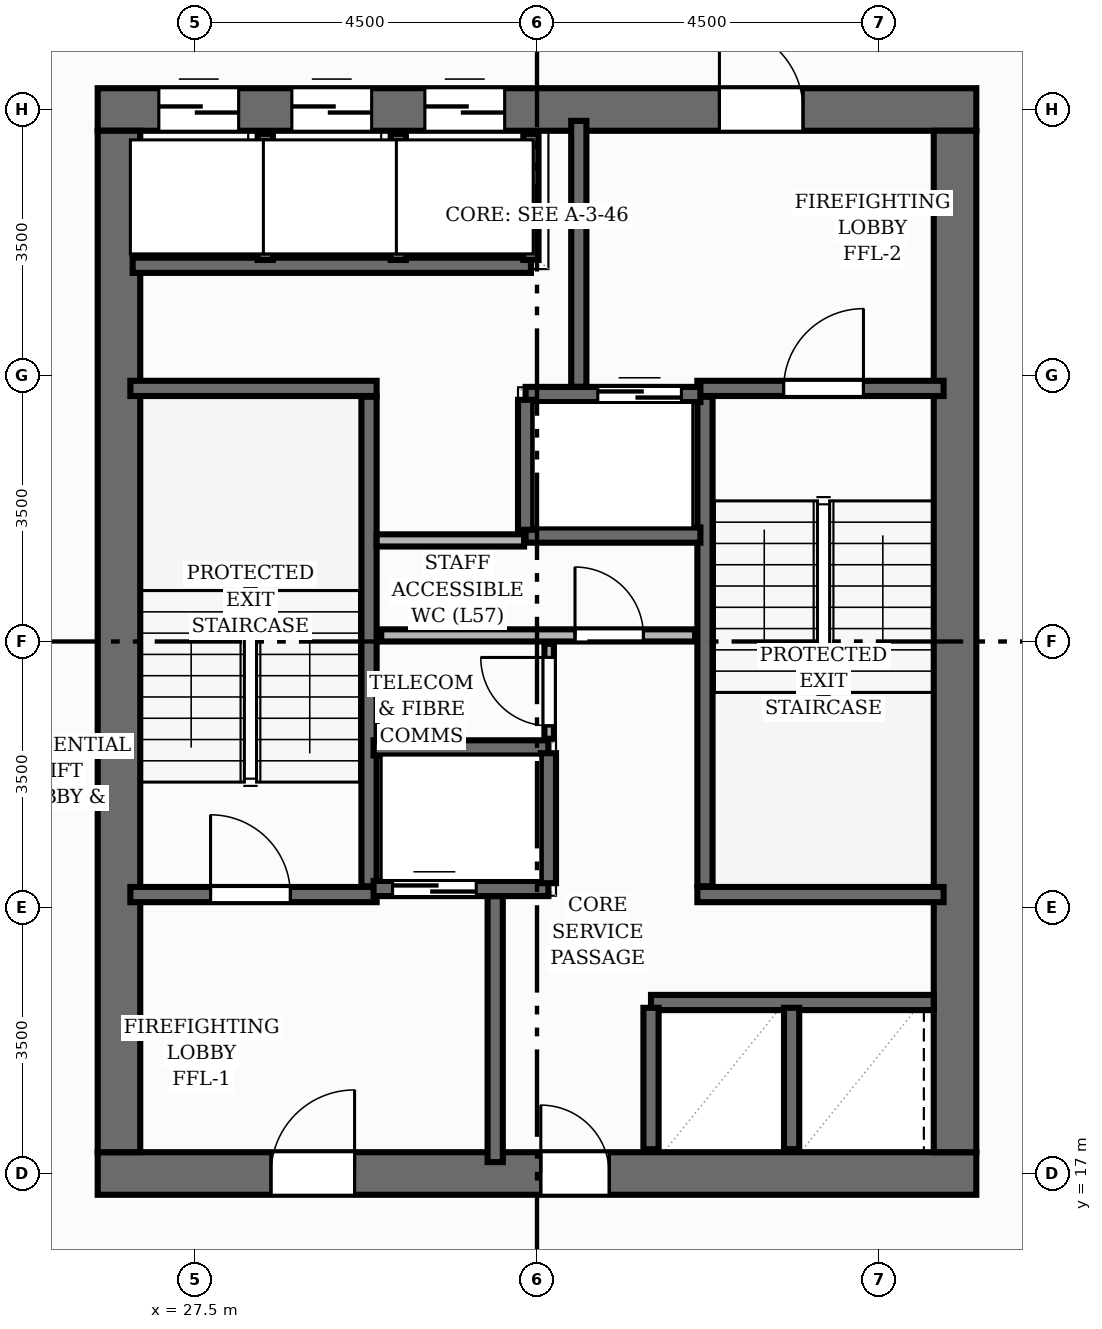
"""IFC4 building model, lengths in metres.
Left out: names, types, materials, properties, quantities, classifications, styles, units other than length and angle.
Written with IfcOpenShell. Run it as: python <this file> out.ifc"""

import sys

from ifc_helpers import new_model, si_unit, direction, frame, frame_2d, origin, place, context, subcontext, project, spatial, rectangle, extrude, element, fill, save


model = new_model("IFC4")
c1 = context("Model", 3, precision=1e-05, world=origin(), true_north=direction((0.0, 1.0)))
c2 = subcontext(c1, "Body", "Model", "MODEL_VIEW")
j1 = project(units=[si_unit("LENGTHUNIT", "METRE"), si_unit("PLANEANGLEUNIT", "RADIAN")], contexts=[c1])
p1 = place(None, origin())
s1 = spatial("IfcSite", under=j1, at=p1, CompositionType="ELEMENT")
p2 = place(p1, origin())
s2 = spatial("IfcBuilding", under=s1, at=p2, CompositionType="ELEMENT")
p3 = place(p2, frame((0.0, 0.0, 191.84)))
s3 = spatial("IfcBuildingStorey", under=s2, at=p3, CompositionType="ELEMENT", Elevation=191.84)
p4 = place(p3, frame((26.22, 17.0, 0.0), z_axis=(0.0, 0.0, 1.0), x_axis=(1.0, 0.0, 0.0)))
e1 = element("IfcWall", 1, at=p4, inside=s3, PredefinedType="SHEAR", context=c2, shape_type="SweptSolid", body=[
    extrude(rectangle(XDim=11.56, YDim=0.56, at=frame_2d((5.78, 0.0))), origin(), (0.0, 0.0, 1.0), 3.2),
])
p5 = place(p4, frame((2.28, 0.0, 0.0)))
e2 = element("IfcOpeningElement", 2, at=p5, cuts=e1, PredefinedType="OPENING", context=c2, shape_type="SweptSolid", body=[
    extrude(rectangle(XDim=1.1, YDim=2.15, at=frame_2d((0.55, 1.075))), frame((0.0, 0.29, 0.0), z_axis=(0.0, -1.0, 0.0), x_axis=(1.0, 0.0, 0.0)), (0.0, 0.0, 1.0), 0.58),
])
p6 = place(p4, frame((5.83, 0.0, 0.0)))
e3 = element("IfcOpeningElement", 3, at=p6, cuts=e1, PredefinedType="OPENING", context=c2, shape_type="SweptSolid", body=[
    extrude(rectangle(XDim=0.9, YDim=2.1, at=frame_2d((0.45, 1.05))), frame((0.0, 0.29, 0.0), z_axis=(0.0, -1.0, 0.0), x_axis=(1.0, 0.0, 0.0)), (0.0, 0.0, 1.0), 0.58),
])
p7 = place(p3, frame((26.22, 31.0, 0.0), z_axis=(0.0, 0.0, 1.0), x_axis=(1.0, 0.0, 0.0)))
e4 = element("IfcWall", 4, at=p7, inside=s3, PredefinedType="SHEAR", context=c2, shape_type="SweptSolid", body=[
    extrude(rectangle(XDim=11.56, YDim=0.56, at=frame_2d((5.78, 0.0))), origin(), (0.0, 0.0, 1.0), 3.2),
])
p8 = place(p7, frame((8.18, 0.0, 0.0)))
e5 = element("IfcOpeningElement", 5, at=p8, cuts=e4, PredefinedType="OPENING", context=c2, shape_type="SweptSolid", body=[
    extrude(rectangle(XDim=1.1, YDim=2.15, at=frame_2d((0.55, 1.075))), frame((0.0, 0.29, 0.0), z_axis=(0.0, -1.0, 0.0), x_axis=(1.0, 0.0, 0.0)), (0.0, 0.0, 1.0), 0.58),
])
p9 = place(p7, frame((0.805, 0.0, 0.0)))
e6 = element("IfcOpeningElement", 6, at=p9, cuts=e4, PredefinedType="OPENING", context=c2, shape_type="SweptSolid", body=[
    extrude(rectangle(XDim=1.05, YDim=2.15, at=frame_2d((0.525, 1.075))), frame((0.0, 0.29, 0.0), z_axis=(0.0, -1.0, 0.0), x_axis=(1.0, 0.0, 0.0)), (0.0, 0.0, 1.0), 0.58),
])
p10 = place(p7, frame((2.555, 0.0, 0.0)))
e7 = element("IfcOpeningElement", 7, at=p10, cuts=e4, PredefinedType="OPENING", context=c2, shape_type="SweptSolid", body=[
    extrude(rectangle(XDim=1.05, YDim=2.15, at=frame_2d((0.525, 1.075))), frame((0.0, 0.29, 0.0), z_axis=(0.0, -1.0, 0.0), x_axis=(1.0, 0.0, 0.0)), (0.0, 0.0, 1.0), 0.58),
])
p11 = place(p7, frame((4.305, 0.0, 0.0)))
e8 = element("IfcOpeningElement", 8, at=p11, cuts=e4, PredefinedType="OPENING", context=c2, shape_type="SweptSolid", body=[
    extrude(rectangle(XDim=1.05, YDim=2.15, at=frame_2d((0.525, 1.075))), frame((0.0, 0.29, 0.0), z_axis=(0.0, -1.0, 0.0), x_axis=(1.0, 0.0, 0.0)), (0.0, 0.0, 1.0), 0.58),
])
for number, where, z_axis, x_axis in (
    (9, (26.5, 17.28, 0.0), (0.0, 0.0, 1.0), (0.0, 1.0, 0.0)),
    (10, (37.5, 17.28, 0.0), (0.0, 0.0, 1.0), (0.0, 1.0, 0.0)),
):
    element("IfcWall", number, at=place(p3, frame(where, z_axis=z_axis, x_axis=x_axis)), inside=s3, PredefinedType="SHEAR", context=c2, shape_type="SweptSolid", body=[
        extrude(rectangle(XDim=13.44, YDim=0.56, at=frame_2d((6.72, 0.0))), origin(), (0.0, 0.0, 1.0), 3.2),
    ])
p12 = place(p3, frame((29.79, 20.78, 0.0), z_axis=(0.0, 0.0, 1.0), x_axis=(0.0, 1.0, 0.0)))
e11 = element("IfcWall", 11, at=p12, inside=s3, PredefinedType="SHEAR", context=c2, shape_type="SweptSolid", body=[
    extrude(rectangle(XDim=6.44, YDim=0.2, at=frame_2d((3.22, 0.0))), origin(), (0.0, 0.0, 1.0), 3.2),
])
p13 = place(p3, frame((26.65, 27.33, 0.0), z_axis=(0.0, 0.0, 1.0), x_axis=(1.0, 0.0, 0.0)))
e12 = element("IfcWall", 12, at=p13, inside=s3, PredefinedType="SHEAR", context=c2, shape_type="SweptSolid", body=[
    extrude(rectangle(XDim=3.24, YDim=0.2, at=frame_2d((1.62, 0.0))), origin(), (0.0, 0.0, 1.0), 3.2),
])
p14 = place(p3, frame((26.65, 20.67, 0.0), z_axis=(0.0, 0.0, 1.0), x_axis=(1.0, 0.0, 0.0)))
e13 = element("IfcWall", 13, at=p14, inside=s3, PredefinedType="SHEAR", context=c2, shape_type="SweptSolid", body=[
    extrude(rectangle(XDim=3.24, YDim=0.2, at=frame_2d((1.62, 0.0))), origin(), (0.0, 0.0, 1.0), 3.2),
])
p15 = place(p14, frame((1.055, 0.0, 0.0)))
e14 = element("IfcOpeningElement", 14, at=p15, cuts=e13, PredefinedType="OPENING", context=c2, shape_type="SweptSolid", body=[
    extrude(rectangle(XDim=1.05, YDim=2.15, at=frame_2d((0.525, 1.075))), frame((0.0, 0.11, 0.0), z_axis=(0.0, -1.0, 0.0), x_axis=(1.0, 0.0, 0.0)), (0.0, 0.0, 1.0), 0.22),
])
p16 = place(p3, frame((34.21, 20.78, 0.0), z_axis=(0.0, 0.0, 1.0), x_axis=(0.0, 1.0, 0.0)))
e15 = element("IfcWall", 15, at=p16, inside=s3, PredefinedType="SHEAR", context=c2, shape_type="SweptSolid", body=[
    extrude(rectangle(XDim=6.44, YDim=0.2, at=frame_2d((3.22, 0.0))), origin(), (0.0, 0.0, 1.0), 3.2),
])
p17 = place(p3, frame((34.11, 20.67, 0.0), z_axis=(0.0, 0.0, 1.0), x_axis=(1.0, 0.0, 0.0)))
e16 = element("IfcWall", 16, at=p17, inside=s3, PredefinedType="SHEAR", context=c2, shape_type="SweptSolid", body=[
    extrude(rectangle(XDim=3.24, YDim=0.2, at=frame_2d((1.62, 0.0))), origin(), (0.0, 0.0, 1.0), 3.2),
])
p18 = place(p3, frame((34.11, 27.33, 0.0), z_axis=(0.0, 0.0, 1.0), x_axis=(1.0, 0.0, 0.0)))
e17 = element("IfcWall", 17, at=p18, inside=s3, PredefinedType="SHEAR", context=c2, shape_type="SweptSolid", body=[
    extrude(rectangle(XDim=3.24, YDim=0.2, at=frame_2d((1.62, 0.0))), origin(), (0.0, 0.0, 1.0), 3.2),
])
p19 = place(p18, frame((1.135, 0.0, 0.0)))
e18 = element("IfcOpeningElement", 18, at=p19, cuts=e17, PredefinedType="OPENING", context=c2, shape_type="SweptSolid", body=[
    extrude(rectangle(XDim=1.05, YDim=2.15, at=frame_2d((0.525, 1.075))), frame((0.0, 0.11, 0.0), z_axis=(0.0, -1.0, 0.0), x_axis=(1.0, 0.0, 0.0)), (0.0, 0.0, 1.0), 0.22),
])
for number, where, z_axis, x_axis in (
    (19, (31.45, 17.15, 0.0), (0.0, 0.0, 1.0), (0.0, 1.0, 0.0)),
    (20, (32.55, 27.35, 0.0), (0.0, 0.0, 1.0), (0.0, 1.0, 0.0)),
):
    element("IfcWall", number, at=place(p3, frame(where, z_axis=z_axis, x_axis=x_axis)), inside=s3, PredefinedType="SHEAR", context=c2, shape_type="SweptSolid", body=[
        extrude(rectangle(XDim=3.5, YDim=0.2, at=frame_2d((1.75, 0.0))), origin(), (0.0, 0.0, 1.0), 3.2),
    ])
p20 = place(p3, frame((29.85, 20.75, 0.0), z_axis=(0.0, 0.0, 1.0), x_axis=(1.0, 0.0, 0.0)))
e21 = element("IfcWall", 21, at=p20, inside=s3, PredefinedType="SHEAR", context=c2, shape_type="SweptSolid", body=[
    extrude(rectangle(XDim=2.3, YDim=0.2, at=frame_2d((1.15, 0.0))), origin(), (0.0, 0.0, 1.0), 3.2),
])
p21 = place(p20, frame((0.25, 0.0, 0.0)))
e22 = element("IfcOpeningElement", 22, at=p21, cuts=e21, PredefinedType="OPENING", context=c2, shape_type="SweptSolid", body=[
    extrude(rectangle(XDim=1.1, YDim=2.15, at=frame_2d((0.55, 1.075))), frame((0.0, 0.11, 0.0), z_axis=(0.0, -1.0, 0.0), x_axis=(1.0, 0.0, 0.0)), (0.0, 0.0, 1.0), 0.22),
])
p22 = place(p3, frame((29.85, 22.6, 0.0), z_axis=(0.0, 0.0, 1.0), x_axis=(1.0, 0.0, 0.0)))
e23 = element("IfcWall", 23, at=p22, inside=s3, PredefinedType="SHEAR", context=c2, shape_type="SweptSolid", body=[
    extrude(rectangle(XDim=2.3, YDim=0.2, at=frame_2d((1.15, 0.0))), origin(), (0.0, 0.0, 1.0), 3.2),
])
p23 = place(p3, frame((32.15, 20.82, 0.0), z_axis=(0.0, 0.0, 1.0), x_axis=(0.0, 1.0, 0.0)))
e24 = element("IfcWall", 24, at=p23, inside=s3, PredefinedType="SHEAR", context=c2, shape_type="SweptSolid", body=[
    extrude(rectangle(XDim=1.71, YDim=0.2, at=frame_2d((0.855, 0.0))), origin(), (0.0, 0.0, 1.0), 3.2),
])
p24 = place(p3, frame((31.85, 27.25, 0.0), z_axis=(0.0, 0.0, 1.0), x_axis=(1.0, 0.0, 0.0)))
e25 = element("IfcWall", 25, at=p24, inside=s3, PredefinedType="SHEAR", context=c2, shape_type="SweptSolid", body=[
    extrude(rectangle(XDim=2.3, YDim=0.2, at=frame_2d((1.15, 0.0))), origin(), (0.0, 0.0, 1.0), 3.2),
])
p25 = place(p24, frame((0.95, 0.0, 0.0)))
e26 = element("IfcOpeningElement", 26, at=p25, cuts=e25, PredefinedType="OPENING", context=c2, shape_type="SweptSolid", body=[
    extrude(rectangle(XDim=1.1, YDim=2.15, at=frame_2d((0.55, 1.075))), frame((0.0, 0.11, 0.0), z_axis=(0.0, -1.0, 0.0), x_axis=(1.0, 0.0, 0.0)), (0.0, 0.0, 1.0), 0.22),
])
p26 = place(p3, frame((31.85, 25.4, 0.0), z_axis=(0.0, 0.0, 1.0), x_axis=(1.0, 0.0, 0.0)))
e27 = element("IfcWall", 27, at=p26, inside=s3, PredefinedType="SHEAR", context=c2, shape_type="SweptSolid", body=[
    extrude(rectangle(XDim=2.3, YDim=0.2, at=frame_2d((1.15, 0.0))), origin(), (0.0, 0.0, 1.0), 3.2),
])
p27 = place(p3, frame((31.85, 25.47, 0.0), z_axis=(0.0, 0.0, 1.0), x_axis=(0.0, 1.0, 0.0)))
e28 = element("IfcWall", 28, at=p27, inside=s3, PredefinedType="SHEAR", context=c2, shape_type="SweptSolid", body=[
    extrude(rectangle(XDim=1.71, YDim=0.2, at=frame_2d((0.855, 0.0))), origin(), (0.0, 0.0, 1.0), 3.2),
])
p28 = place(p3, frame((26.68, 28.95, 0.0), z_axis=(0.0, 0.0, 1.0), x_axis=(1.0, 0.0, 0.0)))
e29 = element("IfcWall", 29, at=p28, inside=s3, PredefinedType="SHEAR", context=c2, shape_type="SweptSolid", body=[
    extrude(rectangle(XDim=5.24, YDim=0.2, at=frame_2d((2.62, 0.0))), origin(), (0.0, 0.0, 1.0), 3.2),
])
for number, where, z_axis, x_axis in (
    (30, (31.92, 29.02, 0.0), (0.0, 0.0, 1.0), (0.0, 1.0, 0.0)),
    (31, (28.425, 29.02, 0.0), (0.0, 0.0, 1.0), (0.0, 1.0, 0.0)),
    (32, (30.175, 29.02, 0.0), (0.0, 0.0, 1.0), (0.0, 1.0, 0.0)),
):
    element("IfcWall", number, at=place(p3, frame(where, z_axis=z_axis, x_axis=x_axis)), inside=s3, PredefinedType="SHEAR", context=c2, shape_type="SweptSolid", body=[
        extrude(rectangle(XDim=1.66, YDim=0.2, at=frame_2d((0.83, 0.0))), origin(), (0.0, 0.0, 1.0), 3.2),
    ])
p29 = place(p3, frame((33.5, 19.25, 0.0), z_axis=(0.0, 0.0, 1.0), x_axis=(1.0, 0.0, 0.0)))
e33 = element("IfcWall", 33, at=p29, inside=s3, PredefinedType="SHEAR", context=c2, shape_type="SweptSolid", body=[
    extrude(rectangle(XDim=3.72, YDim=0.2, at=frame_2d((1.86, 0.0))), origin(), (0.0, 0.0, 1.0), 3.2),
])
for number, where, z_axis, x_axis in (
    (34, (33.5, 17.32, 0.0), (0.0, 0.0, 1.0), (0.0, 1.0, 0.0)),
    (35, (35.35, 17.32, 0.0), (0.0, 0.0, 1.0), (0.0, 1.0, 0.0)),
):
    element("IfcWall", number, at=place(p3, frame(where, z_axis=z_axis, x_axis=x_axis)), inside=s3, PredefinedType="SHEAR", context=c2, shape_type="SweptSolid", body=[
        extrude(rectangle(XDim=1.86, YDim=0.2, at=frame_2d((0.93, 0.0))), origin(), (0.0, 0.0, 1.0), 3.2),
    ])
p30 = place(p3, frame((29.95, 24.08, 0.0), z_axis=(0.0, 0.0, 1.0), x_axis=(1.0, 0.0, 0.0)))
e36 = element("IfcWall", 36, at=p30, inside=s3, PredefinedType="PLUMBINGWALL", context=c2, shape_type="SweptSolid", body=[
    extrude(rectangle(XDim=4.13, YDim=0.16, at=frame_2d((2.065, 0.0))), origin(), (0.0, 0.0, 1.0), 2.955),
])
p31 = place(p30, frame((2.55, 0.0, 0.0)))
e37 = element("IfcOpeningElement", 37, at=p31, cuts=e36, PredefinedType="OPENING", context=c2, shape_type="SweptSolid", body=[
    extrude(rectangle(XDim=0.9, YDim=2.1, at=frame_2d((0.45, 1.05))), frame((0.0, 0.09, 0.0), z_axis=(0.0, -1.0, 0.0), x_axis=(1.0, 0.0, 0.0)), (0.0, 0.0, 1.0), 0.18),
])
p32 = place(p3, frame((32.16, 22.72, 0.0), z_axis=(0.0, 0.0, 1.0), x_axis=(0.0, 1.0, 0.0)))
e38 = element("IfcWall", 38, at=p32, inside=s3, PredefinedType="PARTITIONING", context=c2, shape_type="SweptSolid", body=[
    extrude(rectangle(XDim=1.25, YDim=0.125, at=frame_2d((0.625, 0.0))), origin(), (0.0, 0.0, 1.0), 2.955),
])
p33 = place(p32, frame((0.17, 0.0, 0.0)))
e39 = element("IfcOpeningElement", 39, at=p33, cuts=e38, PredefinedType="OPENING", context=c2, shape_type="SweptSolid", body=[
    extrude(rectangle(XDim=0.9, YDim=2.1, at=frame_2d((0.45, 1.05))), frame((0.0, 0.073, 0.0), z_axis=(0.0, -1.0, 0.0), x_axis=(1.0, 0.0, 0.0)), (0.0, 0.0, 1.0), 0.145),
])
p34 = place(p3, frame((29.89, 25.33, 0.0), z_axis=(0.0, 0.0, 1.0), x_axis=(1.0, 0.0, 0.0)))
e40 = element("IfcWall", 40, at=p34, inside=s3, PredefinedType="PLUMBINGWALL", context=c2, shape_type="SweptSolid", body=[
    extrude(rectangle(XDim=1.94, YDim=0.16, at=frame_2d((0.97, 0.0))), origin(), (0.0, 0.0, 1.0), 2.955),
])
p35 = place(p15, origin())
e41 = element("IfcDoor", 41, at=p35, inside=s3, OperationType="SINGLE_SWING_LEFT", PredefinedType="DOOR", context=c2, shape_type="SweptSolid", body=[
    extrude(rectangle(XDim=1.05, YDim=2.15, at=frame_2d((0.525, 1.075))), frame((0.0, 0.025, 0.0), z_axis=(0.0, -1.0, 0.0), x_axis=(1.0, 0.0, 0.0)), (0.0, 0.0, 1.0), 0.05),
])
fill(e14, e41)
p36 = place(p19, origin())
e42 = element("IfcDoor", 42, at=p36, inside=s3, OperationType="SINGLE_SWING_RIGHT", PredefinedType="DOOR", context=c2, shape_type="SweptSolid", body=[
    extrude(rectangle(XDim=1.05, YDim=2.15, at=frame_2d((0.525, 1.075))), frame((0.0, 0.025, 0.0), z_axis=(0.0, -1.0, 0.0), x_axis=(1.0, 0.0, 0.0)), (0.0, 0.0, 1.0), 0.05),
])
fill(e18, e42)
p37 = place(p5, origin())
e43 = element("IfcDoor", 43, at=p37, inside=s3, OperationType="SINGLE_SWING_RIGHT", PredefinedType="DOOR", context=c2, shape_type="SweptSolid", body=[
    extrude(rectangle(XDim=1.1, YDim=2.15, at=frame_2d((0.55, 1.075))), frame((0.0, 0.025, 0.0), z_axis=(0.0, -1.0, 0.0), x_axis=(1.0, 0.0, 0.0)), (0.0, 0.0, 1.0), 0.05),
])
fill(e2, e43)
p38 = place(p8, origin())
e44 = element("IfcDoor", 44, at=p38, inside=s3, OperationType="SINGLE_SWING_LEFT", PredefinedType="DOOR", context=c2, shape_type="SweptSolid", body=[
    extrude(rectangle(XDim=1.1, YDim=2.15, at=frame_2d((0.55, 1.075))), frame((0.0, 0.025, 0.0), z_axis=(0.0, -1.0, 0.0), x_axis=(1.0, 0.0, 0.0)), (0.0, 0.0, 1.0), 0.05),
])
fill(e5, e44)
p39 = place(p21, origin())
e45 = element("IfcDoor", 45, at=p39, inside=s3, OperationType="DOUBLE_DOOR_SLIDING", PredefinedType="DOOR", context=c2, shape_type="SweptSolid", body=[
    extrude(rectangle(XDim=1.1, YDim=2.15, at=frame_2d((0.55, 1.075))), frame((0.0, 0.025, 0.0), z_axis=(0.0, -1.0, 0.0), x_axis=(1.0, 0.0, 0.0)), (0.0, 0.0, 1.0), 0.05),
])
fill(e22, e45)
p40 = place(p25, origin())
e46 = element("IfcDoor", 46, at=p40, inside=s3, OperationType="DOUBLE_DOOR_SLIDING", PredefinedType="DOOR", context=c2, shape_type="SweptSolid", body=[
    extrude(rectangle(XDim=1.1, YDim=2.15, at=frame_2d((0.55, 1.075))), frame((0.0, 0.025, 0.0), z_axis=(0.0, -1.0, 0.0), x_axis=(1.0, 0.0, 0.0)), (0.0, 0.0, 1.0), 0.05),
])
fill(e26, e46)
p41 = place(p9, origin())
e47 = element("IfcDoor", 47, at=p41, inside=s3, OperationType="DOUBLE_DOOR_SLIDING", PredefinedType="DOOR", context=c2, shape_type="SweptSolid", body=[
    extrude(rectangle(XDim=1.05, YDim=2.15, at=frame_2d((0.525, 1.075))), frame((0.0, 0.025, 0.0), z_axis=(0.0, -1.0, 0.0), x_axis=(1.0, 0.0, 0.0)), (0.0, 0.0, 1.0), 0.05),
])
fill(e6, e47)
p42 = place(p10, origin())
e48 = element("IfcDoor", 48, at=p42, inside=s3, OperationType="DOUBLE_DOOR_SLIDING", PredefinedType="DOOR", context=c2, shape_type="SweptSolid", body=[
    extrude(rectangle(XDim=1.05, YDim=2.15, at=frame_2d((0.525, 1.075))), frame((0.0, 0.025, 0.0), z_axis=(0.0, -1.0, 0.0), x_axis=(1.0, 0.0, 0.0)), (0.0, 0.0, 1.0), 0.05),
])
fill(e7, e48)
p43 = place(p11, origin())
e49 = element("IfcDoor", 49, at=p43, inside=s3, OperationType="DOUBLE_DOOR_SLIDING", PredefinedType="DOOR", context=c2, shape_type="SweptSolid", body=[
    extrude(rectangle(XDim=1.05, YDim=2.15, at=frame_2d((0.525, 1.075))), frame((0.0, 0.025, 0.0), z_axis=(0.0, -1.0, 0.0), x_axis=(1.0, 0.0, 0.0)), (0.0, 0.0, 1.0), 0.05),
])
fill(e8, e49)
p44 = place(p6, origin())
e50 = element("IfcDoor", 50, at=p44, inside=s3, OperationType="SINGLE_SWING_LEFT", PredefinedType="DOOR", context=c2, shape_type="SweptSolid", body=[
    extrude(rectangle(XDim=0.9, YDim=2.1, at=frame_2d((0.45, 1.05))), frame((0.0, 0.025, 0.0), z_axis=(0.0, -1.0, 0.0), x_axis=(1.0, 0.0, 0.0)), (0.0, 0.0, 1.0), 0.05),
])
fill(e3, e50)
p45 = place(p31, origin())
e51 = element("IfcDoor", 51, at=p45, inside=s3, OperationType="SINGLE_SWING_LEFT", PredefinedType="DOOR", context=c2, shape_type="SweptSolid", body=[
    extrude(rectangle(XDim=0.9, YDim=2.1, at=frame_2d((0.45, 1.05))), frame((0.0, 0.025, 0.0), z_axis=(0.0, -1.0, 0.0), x_axis=(1.0, 0.0, 0.0)), (0.0, 0.0, 1.0), 0.05),
])
fill(e37, e51)
p46 = place(p33, origin())
e52 = element("IfcDoor", 52, at=p46, inside=s3, OperationType="SINGLE_SWING_RIGHT", PredefinedType="DOOR", context=c2, shape_type="SweptSolid", body=[
    extrude(rectangle(XDim=0.9, YDim=2.1, at=frame_2d((0.45, 1.05))), frame((0.0, 0.025, 0.0), z_axis=(0.0, -1.0, 0.0), x_axis=(1.0, 0.0, 0.0)), (0.0, 0.0, 1.0), 0.05),
])
fill(e39, e52)
save(model, sys.argv[1])
